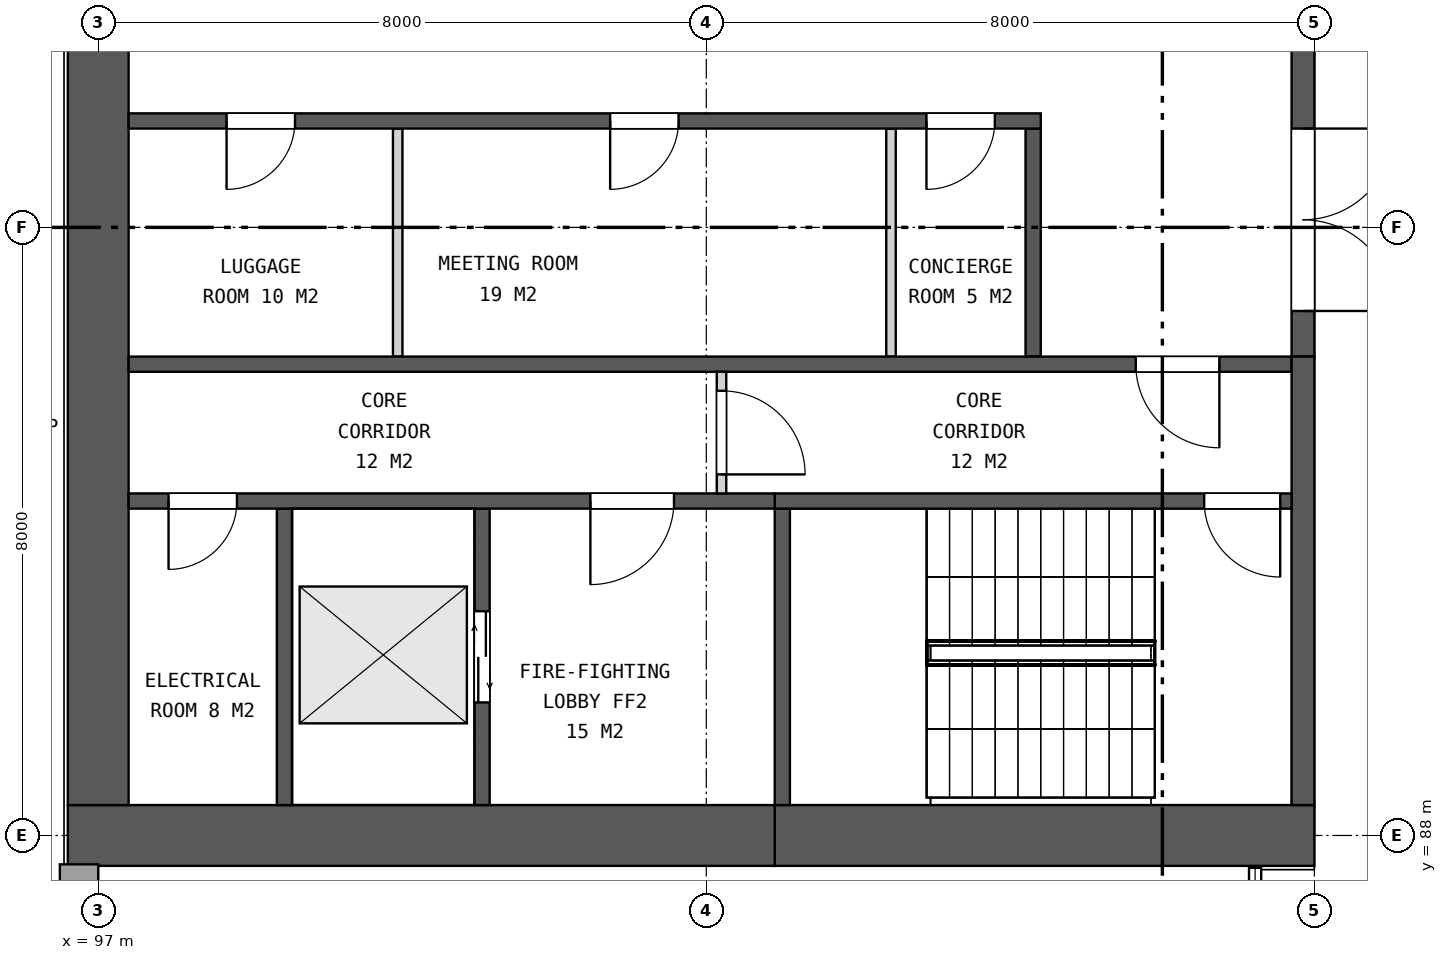
"""IFC4 building model, lengths in metres.
Left out: names, types, materials, properties, quantities, classifications, styles, units other than length and angle.
Written with IfcOpenShell. Run it as: python <this file> out.ifc"""

import sys

from ifc_helpers import new_model, si_unit, direction, frame, frame_2d, origin, place, context, subcontext, project, spatial, rectangle, extrude, element, fill, save


model = new_model("IFC4")
c1 = context("Model", 3, precision=1e-05, world=origin(), true_north=direction((0.0, 1.0)))
c2 = subcontext(c1, "Body", "Model", "MODEL_VIEW")
j1 = project(units=[si_unit("LENGTHUNIT", "METRE"), si_unit("PLANEANGLEUNIT", "RADIAN")], contexts=[c1])
p1 = place(None, origin())
s1 = spatial("IfcSite", under=j1, at=p1, CompositionType="ELEMENT")
p2 = place(p1, origin())
s2 = spatial("IfcBuilding", under=s1, at=p2, CompositionType="ELEMENT")
p3 = place(p2, frame((0.0, 0.0, 47.5)))
s3 = spatial("IfcBuildingStorey", under=s2, at=p3, CompositionType="ELEMENT", Elevation=47.5)
p4 = place(p3, frame((113.0, 88.0, 0.0), z_axis=(0.0, 0.0, 1.0), x_axis=(-1.0, 0.0, 0.0)))
e1 = element("IfcWall", 1, at=p4, inside=s3, PredefinedType="SHEAR", context=c2, shape_type="SweptSolid", body=[
    extrude(rectangle(XDim=7.1, YDim=0.8, at=frame_2d((3.55, 0.0))), origin(), (0.0, 0.0, 1.0), 6.0),
])
p5 = place(p3, frame((105.9, 88.0, 0.0), z_axis=(0.0, 0.0, 1.0), x_axis=(-1.0, 0.0, 0.0)))
e2 = element("IfcWall", 2, at=p5, inside=s3, PredefinedType="SHEAR", context=c2, shape_type="SweptSolid", body=[
    extrude(rectangle(XDim=9.3, YDim=0.8, at=frame_2d((4.65, 0.0))), origin(), (0.0, 0.0, 1.0), 6.0),
])
p6 = place(p3, frame((97.0, 111.6, 0.0), z_axis=(0.0, 0.0, 1.0), x_axis=(0.0, -1.0, 0.0)))
e3 = element("IfcWall", 3, at=p6, inside=s3, PredefinedType="SHEAR", context=c2, shape_type="SweptSolid", body=[
    extrude(rectangle(XDim=23.2, YDim=0.8, at=frame_2d((11.6, 0.0))), origin(), (0.0, 0.0, 1.0), 6.0),
])
p7 = place(p6, frame((10.4, 0.0, 0.0)))
e4 = element("IfcOpeningElement", 4, at=p7, cuts=e3, PredefinedType="OPENING", context=c2, shape_type="SweptSolid", body=[
    extrude(rectangle(XDim=2.4, YDim=2.4, at=frame_2d((1.2, 1.2))), frame((0.0, 0.41, 0.0), z_axis=(0.0, -1.0, 0.0), x_axis=(1.0, 0.0, 0.0)), (0.0, 0.0, 1.0), 0.82),
])
p8 = place(p3, frame((112.85, 105.7, 0.0), z_axis=(0.0, 0.0, 1.0), x_axis=(0.0, -1.0, 0.0)))
e5 = element("IfcWall", 5, at=p8, inside=s3, PredefinedType="SHEAR", context=c2, shape_type="SweptSolid", body=[
    extrude(rectangle(XDim=11.4, YDim=0.3, at=frame_2d((5.7, 0.0))), origin(), (0.0, 0.0, 1.0), 6.0),
])
p9 = place(p8, frame((0.6, 0.0, 0.0)))
e6 = element("IfcOpeningElement", 6, at=p9, cuts=e5, PredefinedType="OPENING", context=c2, shape_type="SweptSolid", body=[
    extrude(rectangle(XDim=2.4, YDim=2.4, at=frame_2d((1.2, 1.2))), frame((0.0, 0.16, 0.0), z_axis=(0.0, -1.0, 0.0), x_axis=(1.0, 0.0, 0.0)), (0.0, 0.0, 1.0), 0.32),
])
p10 = place(p8, frame((4.5, 0.0, 0.0)))
e7 = element("IfcOpeningElement", 7, at=p10, cuts=e5, PredefinedType="OPENING", context=c2, shape_type="SweptSolid", body=[
    extrude(rectangle(XDim=2.4, YDim=2.4, at=frame_2d((1.2, 1.2))), frame((0.0, 0.16, 0.0), z_axis=(0.0, -1.0, 0.0), x_axis=(1.0, 0.0, 0.0)), (0.0, 0.0, 1.0), 0.32),
])
p11 = place(p8, frame((8.4, 0.0, 0.0)))
e8 = element("IfcOpeningElement", 8, at=p11, cuts=e5, PredefinedType="OPENING", context=c2, shape_type="SweptSolid", body=[
    extrude(rectangle(XDim=2.4, YDim=2.4, at=frame_2d((1.2, 1.2))), frame((0.0, 0.16, 0.0), z_axis=(0.0, -1.0, 0.0), x_axis=(1.0, 0.0, 0.0)), (0.0, 0.0, 1.0), 0.32),
])
p12 = place(p3, frame((109.3, 97.3, 0.0), z_axis=(0.0, 0.0, 1.0), x_axis=(0.0, -1.0, 0.0)))
e9 = element("IfcWall", 9, at=p12, inside=s3, PredefinedType="SHEAR", context=c2, shape_type="SweptSolid", body=[
    extrude(rectangle(XDim=3.0, YDim=0.2, at=frame_2d((1.5, 0.0))), origin(), (0.0, 0.0, 1.0), 6.0),
])
for number, where, z_axis, x_axis in (
    (10, (107.43, 97.3, 0.0), (0.0, 0.0, 1.0), (0.0, -1.0, 0.0)),
    (11, (100.94, 97.3, 0.0), (0.0, 0.0, 1.0), (0.0, -1.0, 0.0)),
):
    element("IfcWall", number, at=place(p3, frame(where, z_axis=z_axis, x_axis=x_axis)), inside=s3, PredefinedType="PARTITIONING", context=c2, shape_type="SweptSolid", body=[
        extrude(rectangle(XDim=3.0, YDim=0.125, at=frame_2d((1.5, 0.0))), origin(), (0.0, 0.0, 1.0), 6.0),
    ])
p13 = place(p3, frame((109.4, 97.4, 0.0), z_axis=(0.0, 0.0, 1.0), x_axis=(-1.0, 0.0, 0.0)))
e12 = element("IfcWall", 12, at=p13, inside=s3, PredefinedType="SHEAR", context=c2, shape_type="SweptSolid", body=[
    extrude(rectangle(XDim=12.0, YDim=0.2, at=frame_2d((6.0, 0.0))), origin(), (0.0, 0.0, 1.0), 6.0),
])
p14 = place(p13, frame((0.604, 0.0, 0.0)))
e13 = element("IfcOpeningElement", 13, at=p14, cuts=e12, PredefinedType="OPENING", context=c2, shape_type="SweptSolid", body=[
    extrude(rectangle(XDim=0.9, YDim=2.1, at=frame_2d((0.45, 1.05))), frame((0.0, 0.11, 0.0), z_axis=(0.0, -1.0, 0.0), x_axis=(1.0, 0.0, 0.0)), (0.0, 0.0, 1.0), 0.22),
])
p15 = place(p13, frame((4.765, 0.0, 0.0)))
e14 = element("IfcOpeningElement", 14, at=p15, cuts=e12, PredefinedType="OPENING", context=c2, shape_type="SweptSolid", body=[
    extrude(rectangle(XDim=0.9, YDim=2.1, at=frame_2d((0.45, 1.05))), frame((0.0, 0.11, 0.0), z_axis=(0.0, -1.0, 0.0), x_axis=(1.0, 0.0, 0.0)), (0.0, 0.0, 1.0), 0.22),
])
p16 = place(p13, frame((9.811, 0.0, 0.0)))
e15 = element("IfcOpeningElement", 15, at=p16, cuts=e12, PredefinedType="OPENING", context=c2, shape_type="SweptSolid", body=[
    extrude(rectangle(XDim=0.9, YDim=2.1, at=frame_2d((0.45, 1.05))), frame((0.0, 0.11, 0.0), z_axis=(0.0, -1.0, 0.0), x_axis=(1.0, 0.0, 0.0)), (0.0, 0.0, 1.0), 0.22),
])
p17 = place(p3, frame((112.7, 94.2, 0.0), z_axis=(0.0, 0.0, 1.0), x_axis=(-1.0, 0.0, 0.0)))
e16 = element("IfcWall", 16, at=p17, inside=s3, PredefinedType="SHEAR", context=c2, shape_type="SweptSolid", body=[
    extrude(rectangle(XDim=15.3, YDim=0.2, at=frame_2d((7.65, 0.0))), origin(), (0.0, 0.0, 1.0), 6.0),
])
p18 = place(p17, frame((0.95, 0.0, 0.0)))
e17 = element("IfcOpeningElement", 17, at=p18, cuts=e16, PredefinedType="OPENING", context=c2, shape_type="SweptSolid", body=[
    extrude(rectangle(XDim=1.1, YDim=2.1, at=frame_2d((0.55, 1.05))), frame((0.0, 0.11, 0.0), z_axis=(0.0, -1.0, 0.0), x_axis=(1.0, 0.0, 0.0)), (0.0, 0.0, 1.0), 0.22),
])
p19 = place(p3, frame((112.85, 94.3, 0.0), z_axis=(0.0, 0.0, 1.0), x_axis=(0.0, -1.0, 0.0)))
e18 = element("IfcWall", 18, at=p19, inside=s3, PredefinedType="SHEAR", context=c2, shape_type="SweptSolid", body=[
    extrude(rectangle(XDim=5.9, YDim=0.3, at=frame_2d((2.95, 0.0))), origin(), (0.0, 0.0, 1.0), 6.0),
])
p20 = place(p3, frame((106.0, 92.3, 0.0), z_axis=(0.0, 0.0, 1.0), x_axis=(0.0, -1.0, 0.0)))
e19 = element("IfcWall", 19, at=p20, inside=s3, PredefinedType="SHEAR", context=c2, shape_type="SweptSolid", body=[
    extrude(rectangle(XDim=3.9, YDim=0.2, at=frame_2d((1.95, 0.0))), origin(), (0.0, 0.0, 1.0), 6.0),
])
p21 = place(p3, frame((102.05, 92.3, 0.0), z_axis=(0.0, 0.0, 1.0), x_axis=(0.0, -1.0, 0.0)))
e20 = element("IfcWall", 20, at=p21, inside=s3, PredefinedType="SHEAR", context=c2, shape_type="SweptSolid", body=[
    extrude(rectangle(XDim=3.9, YDim=0.2, at=frame_2d((1.95, 0.0))), origin(), (0.0, 0.0, 1.0), 6.0),
])
p22 = place(p21, frame((1.35, 0.0, 0.0)))
e21 = element("IfcOpeningElement", 21, at=p22, cuts=e20, PredefinedType="OPENING", context=c2, shape_type="SweptSolid", body=[
    extrude(rectangle(XDim=1.2, YDim=2.1, at=frame_2d((0.6, 1.05))), frame((0.0, 0.11, 0.0), z_axis=(0.0, -1.0, 0.0), x_axis=(1.0, 0.0, 0.0)), (0.0, 0.0, 1.0), 0.22),
])
p23 = place(p3, frame((99.45, 92.3, 0.0), z_axis=(0.0, 0.0, 1.0), x_axis=(0.0, -1.0, 0.0)))
e22 = element("IfcWall", 22, at=p23, inside=s3, PredefinedType="SHEAR", context=c2, shape_type="SweptSolid", body=[
    extrude(rectangle(XDim=3.9, YDim=0.2, at=frame_2d((1.95, 0.0))), origin(), (0.0, 0.0, 1.0), 6.0),
])
p24 = place(p3, frame((112.7, 92.4, 0.0), z_axis=(0.0, 0.0, 1.0), x_axis=(-1.0, 0.0, 0.0)))
e23 = element("IfcWall", 23, at=p24, inside=s3, PredefinedType="SHEAR", context=c2, shape_type="SweptSolid", body=[
    extrude(rectangle(XDim=6.8, YDim=0.2, at=frame_2d((3.4, 0.0))), origin(), (0.0, 0.0, 1.0), 6.0),
])
p25 = place(p24, frame((0.15, 0.0, 0.0)))
e24 = element("IfcOpeningElement", 24, at=p25, cuts=e23, PredefinedType="OPENING", context=c2, shape_type="SweptSolid", body=[
    extrude(rectangle(XDim=1.0, YDim=2.1, at=frame_2d((0.5, 1.05))), frame((0.0, 0.11, 0.0), z_axis=(0.0, -1.0, 0.0), x_axis=(1.0, 0.0, 0.0)), (0.0, 0.0, 1.0), 0.22),
])
p26 = place(p3, frame((105.9, 92.4, 0.0), z_axis=(0.0, 0.0, 1.0), x_axis=(-1.0, 0.0, 0.0)))
e25 = element("IfcWall", 25, at=p26, inside=s3, PredefinedType="SHEAR", context=c2, shape_type="SweptSolid", body=[
    extrude(rectangle(XDim=8.5, YDim=0.2, at=frame_2d((4.25, 0.0))), origin(), (0.0, 0.0, 1.0), 6.0),
])
p27 = place(p26, frame((1.325, 0.0, 0.0)))
e26 = element("IfcOpeningElement", 26, at=p27, cuts=e25, PredefinedType="OPENING", context=c2, shape_type="SweptSolid", body=[
    extrude(rectangle(XDim=1.1, YDim=2.1, at=frame_2d((0.55, 1.05))), frame((0.0, 0.11, 0.0), z_axis=(0.0, -1.0, 0.0), x_axis=(1.0, 0.0, 0.0)), (0.0, 0.0, 1.0), 0.22),
])
p28 = place(p26, frame((7.075, 0.0, 0.0)))
e27 = element("IfcOpeningElement", 27, at=p28, cuts=e25, PredefinedType="OPENING", context=c2, shape_type="SweptSolid", body=[
    extrude(rectangle(XDim=0.9, YDim=2.1, at=frame_2d((0.45, 1.05))), frame((0.0, 0.11, 0.0), z_axis=(0.0, -1.0, 0.0), x_axis=(1.0, 0.0, 0.0)), (0.0, 0.0, 1.0), 0.22),
])
p29 = place(p3, frame((105.2, 94.1, 0.0), z_axis=(0.0, 0.0, 1.0), x_axis=(0.0, -1.0, 0.0)))
e28 = element("IfcWall", 28, at=p29, inside=s3, PredefinedType="PARTITIONING", context=c2, shape_type="SweptSolid", body=[
    extrude(rectangle(XDim=1.6, YDim=0.125, at=frame_2d((0.8, 0.0))), origin(), (0.0, 0.0, 1.0), 6.0),
])
p30 = place(p29, frame((0.25, 0.0, 0.0)))
e29 = element("IfcOpeningElement", 29, at=p30, cuts=e28, PredefinedType="OPENING", context=c2, shape_type="SweptSolid", body=[
    extrude(rectangle(XDim=1.1, YDim=2.1, at=frame_2d((0.55, 1.05))), frame((0.0, 0.073, 0.0), z_axis=(0.0, -1.0, 0.0), x_axis=(1.0, 0.0, 0.0)), (0.0, 0.0, 1.0), 0.145),
])
p31 = place(p3, frame((96.495, 87.46, 0.0), z_axis=(0.0, 0.0, 1.0), x_axis=(1.0, 0.0, 0.0)))
e30 = element("IfcWall", 30, at=p31, inside=s3, PredefinedType="SOLIDWALL", context=c2, shape_type="SweptSolid", body=[
    extrude(rectangle(XDim=0.505, YDim=0.32, at=frame_2d((0.252, 0.0))), origin(), (0.0, 0.0, 1.0), 5.72),
])
p32 = place(p11, origin())
e31 = element("IfcDoor", 31, at=p32, inside=s3, OperationType="DOUBLE_DOOR_SINGLE_SWING", PredefinedType="DOOR", context=c2, shape_type="SweptSolid", body=[
    extrude(rectangle(XDim=2.4, YDim=2.4, at=frame_2d((1.2, 1.2))), frame((0.0, 0.025, 0.0), z_axis=(0.0, -1.0, 0.0), x_axis=(1.0, 0.0, 0.0)), (0.0, 0.0, 1.0), 0.05),
])
fill(e8, e31)
p33 = place(p14, origin())
e32 = element("IfcDoor", 32, at=p33, inside=s3, OperationType="SINGLE_SWING_RIGHT", PredefinedType="DOOR", context=c2, shape_type="SweptSolid", body=[
    extrude(rectangle(XDim=0.9, YDim=2.1, at=frame_2d((0.45, 1.05))), frame((0.0, 0.025, 0.0), z_axis=(0.0, -1.0, 0.0), x_axis=(1.0, 0.0, 0.0)), (0.0, 0.0, 1.0), 0.05),
])
fill(e13, e32)
p34 = place(p15, origin())
e33 = element("IfcDoor", 33, at=p34, inside=s3, OperationType="SINGLE_SWING_RIGHT", PredefinedType="DOOR", context=c2, shape_type="SweptSolid", body=[
    extrude(rectangle(XDim=0.9, YDim=2.1, at=frame_2d((0.45, 1.05))), frame((0.0, 0.025, 0.0), z_axis=(0.0, -1.0, 0.0), x_axis=(1.0, 0.0, 0.0)), (0.0, 0.0, 1.0), 0.05),
])
fill(e14, e33)
p35 = place(p16, origin())
e34 = element("IfcDoor", 34, at=p35, inside=s3, OperationType="SINGLE_SWING_RIGHT", PredefinedType="DOOR", context=c2, shape_type="SweptSolid", body=[
    extrude(rectangle(XDim=0.9, YDim=2.1, at=frame_2d((0.45, 1.05))), frame((0.0, 0.025, 0.0), z_axis=(0.0, -1.0, 0.0), x_axis=(1.0, 0.0, 0.0)), (0.0, 0.0, 1.0), 0.05),
])
fill(e15, e34)
p36 = place(p18, origin())
e35 = element("IfcDoor", 35, at=p36, inside=s3, OperationType="SINGLE_SWING_LEFT", PredefinedType="DOOR", context=c2, shape_type="SweptSolid", body=[
    extrude(rectangle(XDim=1.1, YDim=2.1, at=frame_2d((0.55, 1.05))), frame((0.0, 0.025, 0.0), z_axis=(0.0, -1.0, 0.0), x_axis=(1.0, 0.0, 0.0)), (0.0, 0.0, 1.0), 0.05),
])
fill(e17, e35)
p37 = place(p22, origin())
e36 = element("IfcDoor", 36, at=p37, inside=s3, OperationType="DOUBLE_DOOR_SLIDING", PredefinedType="DOOR", context=c2, shape_type="SweptSolid", body=[
    extrude(rectangle(XDim=1.2, YDim=2.1, at=frame_2d((0.6, 1.05))), frame((0.0, 0.025, 0.0), z_axis=(0.0, -1.0, 0.0), x_axis=(1.0, 0.0, 0.0)), (0.0, 0.0, 1.0), 0.05),
])
fill(e21, e36)
p38 = place(p25, origin())
e37 = element("IfcDoor", 37, at=p38, inside=s3, OperationType="SINGLE_SWING_LEFT", PredefinedType="DOOR", context=c2, shape_type="SweptSolid", body=[
    extrude(rectangle(XDim=1.0, YDim=2.1, at=frame_2d((0.5, 1.05))), frame((0.0, 0.025, 0.0), z_axis=(0.0, -1.0, 0.0), x_axis=(1.0, 0.0, 0.0)), (0.0, 0.0, 1.0), 0.05),
])
fill(e24, e37)
p39 = place(p27, origin())
e38 = element("IfcDoor", 38, at=p39, inside=s3, OperationType="SINGLE_SWING_RIGHT", PredefinedType="DOOR", context=c2, shape_type="SweptSolid", body=[
    extrude(rectangle(XDim=1.1, YDim=2.1, at=frame_2d((0.55, 1.05))), frame((0.0, 0.025, 0.0), z_axis=(0.0, -1.0, 0.0), x_axis=(1.0, 0.0, 0.0)), (0.0, 0.0, 1.0), 0.05),
])
fill(e26, e38)
p40 = place(p28, origin())
e39 = element("IfcDoor", 39, at=p40, inside=s3, OperationType="SINGLE_SWING_RIGHT", PredefinedType="DOOR", context=c2, shape_type="SweptSolid", body=[
    extrude(rectangle(XDim=0.9, YDim=2.1, at=frame_2d((0.45, 1.05))), frame((0.0, 0.025, 0.0), z_axis=(0.0, -1.0, 0.0), x_axis=(1.0, 0.0, 0.0)), (0.0, 0.0, 1.0), 0.05),
])
fill(e27, e39)
p41 = place(p30, origin())
e40 = element("IfcDoor", 40, at=p41, inside=s3, OperationType="SINGLE_SWING_RIGHT", PredefinedType="DOOR", context=c2, shape_type="SweptSolid", body=[
    extrude(rectangle(XDim=1.1, YDim=2.1, at=frame_2d((0.55, 1.05))), frame((0.0, 0.025, 0.0), z_axis=(0.0, -1.0, 0.0), x_axis=(1.0, 0.0, 0.0)), (0.0, 0.0, 1.0), 0.05),
])
fill(e29, e40)
save(model, sys.argv[1])
